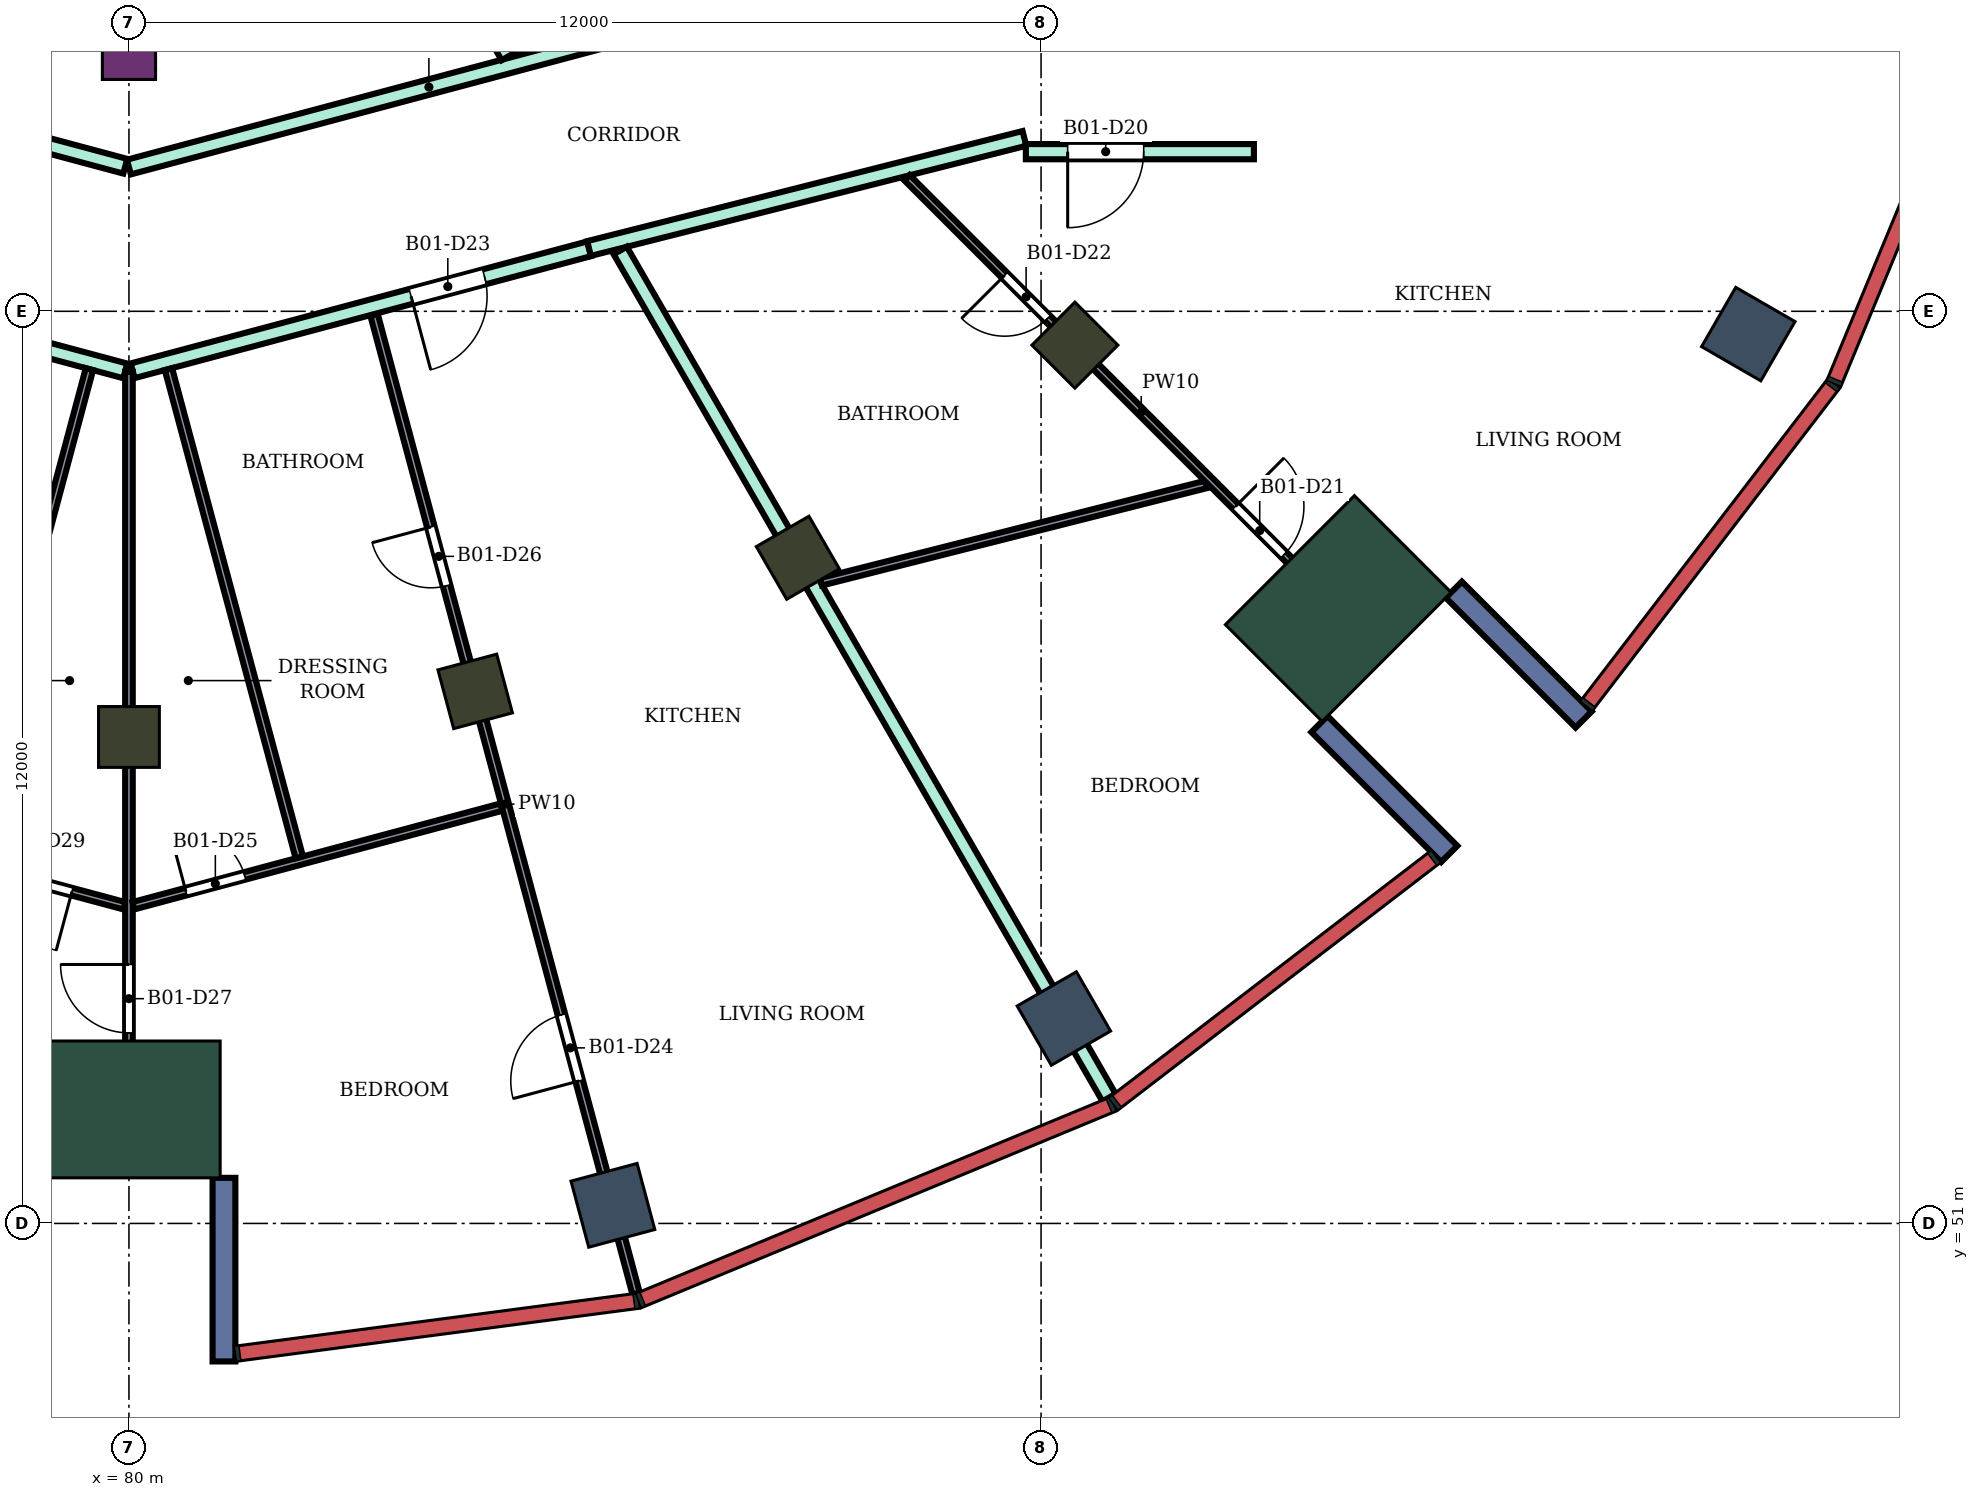
"""IFC4 building model, lengths in metres.
Left out: names, types, materials, properties, quantities, classifications, styles, units other than length and angle.
Written with IfcOpenShell. Run it as: python <this file> out.ifc"""

import sys

from ifc_helpers import new_model, si_unit, direction, frame, frame_2d, origin, origin_2d, place, context, subcontext, project, spatial, rectangle, extrude, element, fill, save


model = new_model("IFC4")
c1 = context("Model", 3, precision=1e-05, world=origin(), true_north=direction((0.0, 1.0)))
c2 = subcontext(c1, "Body", "Model", "MODEL_VIEW")
j1 = project(units=[si_unit("LENGTHUNIT", "METRE"), si_unit("PLANEANGLEUNIT", "RADIAN")], contexts=[c1])
p1 = place(None, origin())
s1 = spatial("IfcSite", under=j1, at=p1, CompositionType="ELEMENT")
p2 = place(p1, origin())
s2 = spatial("IfcBuilding", under=s1, at=p2, CompositionType="ELEMENT")
p3 = place(p2, frame((0.0, 0.0, 212.5)))
s3 = spatial("IfcBuildingStorey", under=s2, at=p3, CompositionType="ELEMENT", Elevation=212.5)
for number, where, z_axis, x_axis in (
    (1, (86.367, 51.238, 0.0), (0.0, 0.0, 1.0), (0.259, -0.966, 0.0)),
    (2, (92.3, 53.696, 0.0), (0.0, 0.0, 1.0), (0.5, -0.866, 0.0)),
    (3, (101.304, 62.7, 0.0), (0.0, 0.0, 1.0), (0.866, -0.5, 0.0)),
):
    element("IfcColumn", number, at=place(p3, frame(where, z_axis=z_axis, x_axis=x_axis)), inside=s3, PredefinedType="COLUMN", context=c2, shape_type="SweptSolid", body=[
        extrude(rectangle(XDim=0.9, YDim=0.9, at=origin_2d()), origin(), (0.0, 0.0, 1.0), 4.2),
    ])
for number, where, z_axis, x_axis in (
    (4, (80.0, 57.4, 0.0), (0.0, 0.0, 1.0), (0.0, -1.0, 0.0)),
    (5, (84.555, 58.0, 0.0), (0.0, 0.0, 1.0), (0.259, -0.966, 0.0)),
    (6, (88.8, 59.758, 0.0), (0.0, 0.0, 1.0), (0.5, -0.866, 0.0)),
    (7, (92.445, 62.555, 0.0), (0.0, 0.0, 1.0), (0.707, -0.707, 0.0)),
):
    element("IfcColumn", number, at=place(p3, frame(where, z_axis=z_axis, x_axis=x_axis)), inside=s3, PredefinedType="COLUMN", context=c2, shape_type="SweptSolid", body=[
        extrude(rectangle(XDim=0.8, YDim=0.8, at=origin_2d()), origin(), (0.0, 0.0, 1.0), 4.2),
    ])
p4 = place(p3, frame((80.0, 66.4, 0.0), z_axis=(0.0, 0.0, 1.0), x_axis=(0.0, -1.0, 0.0)))
e8 = element("IfcColumn", 8, at=p4, inside=s3, PredefinedType="COLUMN", context=c2, shape_type="SweptSolid", body=[
    extrude(rectangle(XDim=0.7, YDim=0.7, at=origin_2d()), origin(), (0.0, 0.0, 1.0), 4.2),
])
for number, where, z_axis, x_axis in (
    (9, (80.0, 52.5, 0.0), (0.0, 0.0, 1.0), (0.0, -1.0, 0.0)),
    (10, (95.91, 59.09, 0.0), (0.0, 0.0, 1.0), (0.707, -0.707, 0.0)),
):
    element("IfcColumn", number, at=place(p3, frame(where, z_axis=z_axis, x_axis=x_axis)), inside=s3, PredefinedType="COLUMN", context=c2, shape_type="SweptSolid", body=[
        extrude(rectangle(XDim=1.8, YDim=2.4, at=origin_2d()), origin(), (0.0, 0.0, 1.0), 4.2),
    ])
for number, where, z_axis, x_axis in (
    (11, (81.25, 51.6, 0.0), (0.0, 0.0, 1.0), (0.0, -1.0, 0.0)),
    (12, (95.662, 57.57, 0.0), (0.0, 0.0, 1.0), (0.707, -0.707, 0.0)),
    (13, (97.43, 59.338, 0.0), (0.0, 0.0, 1.0), (0.707, -0.707, 0.0)),
):
    element("IfcWall", number, at=place(p3, frame(where, z_axis=z_axis, x_axis=x_axis)), inside=s3, PredefinedType="NOTDEFINED", context=c2, shape_type="SweptSolid", body=[
        extrude(rectangle(XDim=2.416, YDim=0.3, at=frame_2d((1.208, 0.0))), origin(), (0.0, 0.0, 1.0), 4.2),
    ])
p5 = place(p3, frame((73.947, 63.826, 0.0), z_axis=(0.0, 0.0, 1.0), x_axis=(0.965876152316, -0.259004359784, 0.0)))
e14 = element("IfcWall", 14, at=p5, inside=s3, PredefinedType="PARTITIONING", context=c2, shape_type="SweptSolid", body=[
    extrude(rectangle(XDim=6.217, YDim=0.2, at=frame_2d((3.108, 0.0))), origin(), (0.0, 0.0, 1.0), 3.75),
])
p6 = place(p5, frame((0.137, 0.0, 0.0)))
e15 = element("IfcOpeningElement", 15, at=p6, cuts=e14, PredefinedType="OPENING", context=c2, shape_type="SweptSolid", body=[
    extrude(rectangle(XDim=1.0, YDim=2.1, at=frame_2d((0.5, 1.05))), frame((0.0, 0.11, 0.0), z_axis=(0.0, -1.0, 0.0), x_axis=(1.0, 0.0, 0.0)), (0.0, 0.0, 1.0), 0.22),
])
p7 = place(p3, frame((74.603, 66.342, 0.0), z_axis=(0.0, 0.0, 1.0), x_axis=(0.965895298152, -0.258932950796, 0.0)))
e16 = element("IfcWall", 16, at=p7, inside=s3, PredefinedType="PARTITIONING", context=c2, shape_type="SweptSolid", body=[
    extrude(rectangle(XDim=5.538, YDim=0.2, at=frame_2d((2.769, 0.0))), origin(), (0.0, 0.0, 1.0), 3.75),
])
p8 = place(p7, frame((2.062, 0.0, 0.0)))
e17 = element("IfcOpeningElement", 17, at=p8, cuts=e16, PredefinedType="OPENING", context=c2, shape_type="SweptSolid", body=[
    extrude(rectangle(XDim=1.8, YDim=2.1, at=frame_2d((0.9, 1.05))), frame((0.0, 0.11, 0.0), z_axis=(0.0, -1.0, 0.0), x_axis=(1.0, 0.0, 0.0)), (0.0, 0.0, 1.0), 0.22),
])
p9 = place(p3, frame((80.0, 64.898, 0.0), z_axis=(0.0, 0.0, 1.0), x_axis=(0.966237419782, 0.257653349704, 0.0)))
e18 = element("IfcWall", 18, at=p9, inside=s3, PredefinedType="PARTITIONING", context=c2, shape_type="SweptSolid", body=[
    extrude(rectangle(XDim=8.169, YDim=0.2, at=frame_2d((4.084, 0.0))), origin(), (0.0, 0.0, 1.0), 3.75),
])
p10 = place(p9, frame((6.428, 0.0, 0.0)))
e19 = element("IfcOpeningElement", 19, at=p10, cuts=e18, PredefinedType="OPENING", context=c2, shape_type="SweptSolid", body=[
    extrude(rectangle(XDim=0.9, YDim=2.1, at=frame_2d((0.45, 1.05))), frame((0.0, 0.11, 0.0), z_axis=(0.0, -1.0, 0.0), x_axis=(1.0, 0.0, 0.0)), (0.0, 0.0, 1.0), 0.22),
])
p11 = place(p3, frame((80.048, 62.217, 0.0), z_axis=(0.0, 0.0, 1.0), x_axis=(0.966097920642, 0.258175923996, 0.0)))
e20 = element("IfcWall", 20, at=p11, inside=s3, PredefinedType="PARTITIONING", context=c2, shape_type="SweptSolid", body=[
    extrude(rectangle(XDim=6.217, YDim=0.2, at=frame_2d((3.108, 0.0))), origin(), (0.0, 0.0, 1.0), 3.75),
])
p12 = place(p11, frame((3.792, 0.0, 0.0)))
e21 = element("IfcOpeningElement", 21, at=p12, cuts=e20, PredefinedType="OPENING", context=c2, shape_type="SweptSolid", body=[
    extrude(rectangle(XDim=1.0, YDim=2.1, at=frame_2d((0.5, 1.05))), frame((0.0, 0.11, 0.0), z_axis=(0.0, -1.0, 0.0), x_axis=(1.0, 0.0, 0.0)), (0.0, 0.0, 1.0), 0.22),
])
p13 = place(p3, frame((83.848, 68.331, 0.0), z_axis=(0.0, 0.0, 1.0), x_axis=(0.499851978358, -0.866110847255, 0.0)))
e22 = element("IfcWall", 22, at=p13, inside=s3, PredefinedType="PARTITIONING", context=c2, shape_type="SweptSolid", body=[
    extrude(rectangle(XDim=2.284, YDim=0.2, at=frame_2d((1.142, 0.0))), origin(), (0.0, 0.0, 1.0), 3.75),
])
p14 = place(p3, frame((86.053, 63.826, 0.0), z_axis=(0.0, 0.0, 1.0), x_axis=(0.969490004987, 0.245130843083, 0.0)))
e23 = element("IfcWall", 23, at=p14, inside=s3, PredefinedType="PARTITIONING", context=c2, shape_type="SweptSolid", body=[
    extrude(rectangle(XDim=5.908, YDim=0.2, at=frame_2d((2.954, 0.0))), origin(), (0.0, 0.0, 1.0), 3.75),
])
p15 = place(p3, frame((86.463, 63.8, 0.0), z_axis=(0.0, 0.0, 1.0), x_axis=(0.499827034849, -0.866125242234, 0.0)))
e24 = element("IfcWall", 24, at=p15, inside=s3, PredefinedType="PARTITIONING", context=c2, shape_type="SweptSolid", body=[
    extrude(rectangle(XDim=12.866, YDim=0.2, at=frame_2d((6.433, 0.0))), origin(), (0.0, 0.0, 1.0), 3.75),
])
p16 = place(p3, frame((91.8, 65.1, 0.0), z_axis=(0.0, 0.0, 1.0), x_axis=(1.0, 0.0, 0.0)))
e25 = element("IfcWall", 25, at=p16, inside=s3, PredefinedType="PARTITIONING", context=c2, shape_type="SweptSolid", body=[
    extrude(rectangle(XDim=3.0, YDim=0.2, at=frame_2d((1.5, 0.0))), origin(), (0.0, 0.0, 1.0), 3.75),
])
p17 = place(p16, frame((0.55, 0.0, 0.0)))
e26 = element("IfcOpeningElement", 26, at=p17, cuts=e25, PredefinedType="OPENING", context=c2, shape_type="SweptSolid", body=[
    extrude(rectangle(XDim=1.0, YDim=2.1, at=frame_2d((0.5, 1.05))), frame((0.0, 0.11, 0.0), z_axis=(0.0, -1.0, 0.0), x_axis=(1.0, 0.0, 0.0)), (0.0, 0.0, 1.0), 0.22),
])
p18 = place(p3, frame((70.188, 57.794, 0.0), z_axis=(0.0, 0.0, 1.0), x_axis=(0.965894620005, -0.25893548047, 0.0)))
e27 = element("IfcWall", 27, at=p18, inside=s3, PredefinedType="PARTITIONING", context=c2, shape_type="SweptSolid", body=[
    extrude(rectangle(XDim=10.098, YDim=0.1, at=frame_2d((5.049, 0.0))), origin(), (0.0, 0.0, 1.0), 3.75),
])
p19 = place(p18, frame((6.034, 0.0, 0.0)))
e28 = element("IfcOpeningElement", 28, at=p19, cuts=e27, PredefinedType="OPENING", context=c2, shape_type="SweptSolid", body=[
    extrude(rectangle(XDim=0.8, YDim=2.1, at=frame_2d((0.4, 1.05))), frame((0.0, 0.06, 0.0), z_axis=(0.0, -1.0, 0.0), x_axis=(1.0, 0.0, 0.0)), (0.0, 0.0, 1.0), 0.12),
])
p20 = place(p18, frame((8.581, 0.0, 0.0)))
e29 = element("IfcOpeningElement", 29, at=p20, cuts=e27, PredefinedType="OPENING", context=c2, shape_type="SweptSolid", body=[
    extrude(rectangle(XDim=0.8, YDim=2.1, at=frame_2d((0.4, 1.05))), frame((0.0, 0.06, 0.0), z_axis=(0.0, -1.0, 0.0), x_axis=(1.0, 0.0, 0.0)), (0.0, 0.0, 1.0), 0.12),
])
p21 = place(p18, frame((1.156, 0.0, 0.0)))
e30 = element("IfcOpeningElement", 30, at=p21, cuts=e27, PredefinedType="OPENING", context=c2, shape_type="SweptSolid", body=[
    extrude(rectangle(XDim=0.9, YDim=2.1, at=frame_2d((0.45, 1.05))), frame((0.0, 0.06, 0.0), z_axis=(0.0, -1.0, 0.0), x_axis=(1.0, 0.0, 0.0)), (0.0, 0.0, 1.0), 0.12),
])
p22 = place(p3, frame((77.759, 55.816, 0.0), z_axis=(0.0, 0.0, 1.0), x_axis=(0.258802763352, 0.965930188824, 0.0)))
e31 = element("IfcWall", 31, at=p22, inside=s3, PredefinedType="PARTITIONING", context=c2, shape_type="SweptSolid", body=[
    extrude(rectangle(XDim=6.65, YDim=0.1, at=frame_2d((3.325, 0.0))), origin(), (0.0, 0.0, 1.0), 3.75),
])
p23 = place(p3, frame((80.0, 51.8, 0.0), z_axis=(0.0, 0.0, 1.0), x_axis=(0.0, 1.0, 0.0)))
e32 = element("IfcWall", 32, at=p23, inside=s3, PredefinedType="PARTITIONING", context=c2, shape_type="SweptSolid", body=[
    extrude(rectangle(XDim=10.404, YDim=0.1, at=frame_2d((5.202, 0.0))), origin(), (0.0, 0.0, 1.0), 3.75),
])
p24 = place(p23, frame((1.707, 0.0, 0.0)))
e33 = element("IfcOpeningElement", 33, at=p24, cuts=e32, PredefinedType="OPENING", context=c2, shape_type="SweptSolid", body=[
    extrude(rectangle(XDim=0.9, YDim=2.1, at=frame_2d((0.45, 1.05))), frame((0.0, 0.06, 0.0), z_axis=(0.0, -1.0, 0.0), x_axis=(1.0, 0.0, 0.0)), (0.0, 0.0, 1.0), 0.12),
])
p25 = place(p3, frame((80.058, 55.179, 0.0), z_axis=(0.0, 0.0, 1.0), x_axis=(0.965917403523, 0.258850477246, 0.0)))
e34 = element("IfcWall", 34, at=p25, inside=s3, PredefinedType="PARTITIONING", context=c2, shape_type="SweptSolid", body=[
    extrude(rectangle(XDim=5.014, YDim=0.1, at=frame_2d((2.507, 0.0))), origin(), (0.0, 0.0, 1.0), 3.75),
])
p26 = place(p25, frame((0.717, 0.0, 0.0)))
e35 = element("IfcOpeningElement", 35, at=p26, cuts=e34, PredefinedType="OPENING", context=c2, shape_type="SweptSolid", body=[
    extrude(rectangle(XDim=0.8, YDim=2.1, at=frame_2d((0.4, 1.05))), frame((0.0, 0.06, 0.0), z_axis=(0.0, -1.0, 0.0), x_axis=(1.0, 0.0, 0.0)), (0.0, 0.0, 1.0), 0.12),
])
p27 = place(p3, frame((80.52, 62.24, 0.0), z_axis=(0.0, 0.0, 1.0), x_axis=(0.258802763352, -0.965930188824, 0.0)))
e36 = element("IfcWall", 36, at=p27, inside=s3, PredefinedType="PARTITIONING", context=c2, shape_type="SweptSolid", body=[
    extrude(rectangle(XDim=6.65, YDim=0.1, at=frame_2d((3.325, 0.0))), origin(), (0.0, 0.0, 1.0), 3.75),
])
p28 = place(p3, frame((83.224, 62.954, 0.0), z_axis=(0.0, 0.0, 1.0), x_axis=(0.258647574365, -0.965971755423, 0.0)))
e37 = element("IfcWall", 37, at=p28, inside=s3, PredefinedType="PARTITIONING", context=c2, shape_type="SweptSolid", body=[
    extrude(rectangle(XDim=13.328, YDim=0.1, at=frame_2d((6.664, 0.0))), origin(), (0.0, 0.0, 1.0), 3.75),
])
p29 = place(p28, frame((9.534, 0.0, 0.0)))
e38 = element("IfcOpeningElement", 38, at=p29, cuts=e37, PredefinedType="OPENING", context=c2, shape_type="SweptSolid", body=[
    extrude(rectangle(XDim=0.9, YDim=2.1, at=frame_2d((0.45, 1.05))), frame((0.0, 0.06, 0.0), z_axis=(0.0, -1.0, 0.0), x_axis=(1.0, 0.0, 0.0)), (0.0, 0.0, 1.0), 0.12),
])
p30 = place(p28, frame((2.89, 0.0, 0.0)))
e39 = element("IfcOpeningElement", 39, at=p30, cuts=e37, PredefinedType="OPENING", context=c2, shape_type="SweptSolid", body=[
    extrude(rectangle(XDim=0.8, YDim=2.1, at=frame_2d((0.4, 1.05))), frame((0.0, 0.06, 0.0), z_axis=(0.0, -1.0, 0.0), x_axis=(1.0, 0.0, 0.0)), (0.0, 0.0, 1.0), 0.12),
])
p31 = place(p3, frame((89.106, 59.441, 0.0), z_axis=(0.0, 0.0, 1.0), x_axis=(0.969462385749, 0.245240051009, 0.0)))
e40 = element("IfcWall", 40, at=p31, inside=s3, PredefinedType="PARTITIONING", context=c2, shape_type="SweptSolid", body=[
    extrude(rectangle(XDim=5.223, YDim=0.1, at=frame_2d((2.612, 0.0))), origin(), (0.0, 0.0, 1.0), 3.75),
])
p32 = place(p3, frame((90.236, 64.758, 0.0), z_axis=(0.0, 0.0, 1.0), x_axis=(0.706938769128, -0.707274753334, 0.0)))
e41 = element("IfcWall", 41, at=p32, inside=s3, PredefinedType="PARTITIONING", context=c2, shape_type="SweptSolid", body=[
    extrude(rectangle(XDim=8.72, YDim=0.1, at=frame_2d((4.36, 0.0))), origin(), (0.0, 0.0, 1.0), 3.75),
])
p33 = place(p32, frame((6.115, 0.0, 0.0)))
e42 = element("IfcOpeningElement", 42, at=p33, cuts=e41, PredefinedType="OPENING", context=c2, shape_type="SweptSolid", body=[
    extrude(rectangle(XDim=0.9, YDim=2.1, at=frame_2d((0.45, 1.05))), frame((0.0, 0.06, 0.0), z_axis=(0.0, -1.0, 0.0), x_axis=(1.0, 0.0, 0.0)), (0.0, 0.0, 1.0), 0.12),
])
p34 = place(p32, frame((1.817, 0.0, 0.0)))
e43 = element("IfcOpeningElement", 43, at=p34, cuts=e41, PredefinedType="OPENING", context=c2, shape_type="SweptSolid", body=[
    extrude(rectangle(XDim=0.8, YDim=2.1, at=frame_2d((0.4, 1.05))), frame((0.0, 0.06, 0.0), z_axis=(0.0, -1.0, 0.0), x_axis=(1.0, 0.0, 0.0)), (0.0, 0.0, 1.0), 0.12),
])
p35 = place(p17, frame((1.0, 0.0, 0.0), z_axis=(0.0, 0.0, 1.0), x_axis=(-1.0, 0.0, 0.0)))
e44 = element("IfcDoor", 44, at=p35, inside=s3, OperationType="SINGLE_SWING_RIGHT", PredefinedType="DOOR", context=c2, shape_type="SweptSolid", body=[
    extrude(rectangle(XDim=1.0, YDim=2.1, at=frame_2d((0.5, 1.05))), frame((0.0, 0.025, 0.0), z_axis=(0.0, -1.0, 0.0), x_axis=(1.0, 0.0, 0.0)), (0.0, 0.0, 1.0), 0.05),
])
fill(e26, e44)
p36 = place(p33, origin())
e45 = element("IfcDoor", 45, at=p36, inside=s3, OperationType="SINGLE_SWING_LEFT", PredefinedType="DOOR", context=c2, shape_type="SweptSolid", body=[
    extrude(rectangle(XDim=0.9, YDim=2.1, at=frame_2d((0.45, 1.05))), frame((0.0, 0.025, 0.0), z_axis=(0.0, -1.0, 0.0), x_axis=(1.0, 0.0, 0.0)), (0.0, 0.0, 1.0), 0.05),
])
fill(e42, e45)
p37 = place(p34, frame((0.8, 0.0, 0.0), z_axis=(0.0, 0.0, 1.0), x_axis=(-1.0, 0.0, 0.0)))
e46 = element("IfcDoor", 46, at=p37, inside=s3, OperationType="SINGLE_SWING_RIGHT", PredefinedType="DOOR", context=c2, shape_type="SweptSolid", body=[
    extrude(rectangle(XDim=0.8, YDim=2.1, at=frame_2d((0.4, 1.05))), frame((0.0, 0.025, 0.0), z_axis=(0.0, -1.0, 0.0), x_axis=(1.0, 0.0, 0.0)), (0.0, 0.0, 1.0), 0.05),
])
fill(e43, e46)
p38 = place(p12, frame((1.0, 0.0, 0.0), z_axis=(0.0, 0.0, 1.0), x_axis=(-1.0, 0.0, 0.0)))
e47 = element("IfcDoor", 47, at=p38, inside=s3, OperationType="SINGLE_SWING_RIGHT", PredefinedType="DOOR", context=c2, shape_type="SweptSolid", body=[
    extrude(rectangle(XDim=1.0, YDim=2.1, at=frame_2d((0.5, 1.05))), frame((0.0, 0.025, 0.0), z_axis=(0.0, -1.0, 0.0), x_axis=(1.0, 0.0, 0.0)), (0.0, 0.0, 1.0), 0.05),
])
fill(e21, e47)
p39 = place(p29, frame((0.9, 0.0, 0.0), z_axis=(0.0, 0.0, 1.0), x_axis=(-1.0, 0.0, 0.0)))
e48 = element("IfcDoor", 48, at=p39, inside=s3, OperationType="SINGLE_SWING_LEFT", PredefinedType="DOOR", context=c2, shape_type="SweptSolid", body=[
    extrude(rectangle(XDim=0.9, YDim=2.1, at=frame_2d((0.45, 1.05))), frame((0.0, 0.025, 0.0), z_axis=(0.0, -1.0, 0.0), x_axis=(1.0, 0.0, 0.0)), (0.0, 0.0, 1.0), 0.05),
])
fill(e38, e48)
p40 = place(p26, origin())
e49 = element("IfcDoor", 49, at=p40, inside=s3, OperationType="SINGLE_SWING_LEFT", PredefinedType="DOOR", context=c2, shape_type="SweptSolid", body=[
    extrude(rectangle(XDim=0.8, YDim=2.1, at=frame_2d((0.4, 1.05))), frame((0.0, 0.025, 0.0), z_axis=(0.0, -1.0, 0.0), x_axis=(1.0, 0.0, 0.0)), (0.0, 0.0, 1.0), 0.05),
])
fill(e35, e49)
p41 = place(p30, frame((0.8, 0.0, 0.0), z_axis=(0.0, 0.0, 1.0), x_axis=(-1.0, 0.0, 0.0)))
e50 = element("IfcDoor", 50, at=p41, inside=s3, OperationType="SINGLE_SWING_RIGHT", PredefinedType="DOOR", context=c2, shape_type="SweptSolid", body=[
    extrude(rectangle(XDim=0.8, YDim=2.1, at=frame_2d((0.4, 1.05))), frame((0.0, 0.025, 0.0), z_axis=(0.0, -1.0, 0.0), x_axis=(1.0, 0.0, 0.0)), (0.0, 0.0, 1.0), 0.05),
])
fill(e39, e50)
p42 = place(p24, origin())
e51 = element("IfcDoor", 51, at=p42, inside=s3, OperationType="SINGLE_SWING_RIGHT", PredefinedType="DOOR", context=c2, shape_type="SweptSolid", body=[
    extrude(rectangle(XDim=0.9, YDim=2.1, at=frame_2d((0.45, 1.05))), frame((0.0, 0.025, 0.0), z_axis=(0.0, -1.0, 0.0), x_axis=(1.0, 0.0, 0.0)), (0.0, 0.0, 1.0), 0.05),
])
fill(e33, e51)
p43 = place(p20, frame((0.8, 0.0, 0.0), z_axis=(0.0, 0.0, 1.0), x_axis=(-1.0, 0.0, 0.0)))
e52 = element("IfcDoor", 52, at=p43, inside=s3, OperationType="SINGLE_SWING_LEFT", PredefinedType="DOOR", context=c2, shape_type="SweptSolid", body=[
    extrude(rectangle(XDim=0.8, YDim=2.1, at=frame_2d((0.4, 1.05))), frame((0.0, 0.025, 0.0), z_axis=(0.0, -1.0, 0.0), x_axis=(1.0, 0.0, 0.0)), (0.0, 0.0, 1.0), 0.05),
])
fill(e29, e52)
save(model, sys.argv[1])
